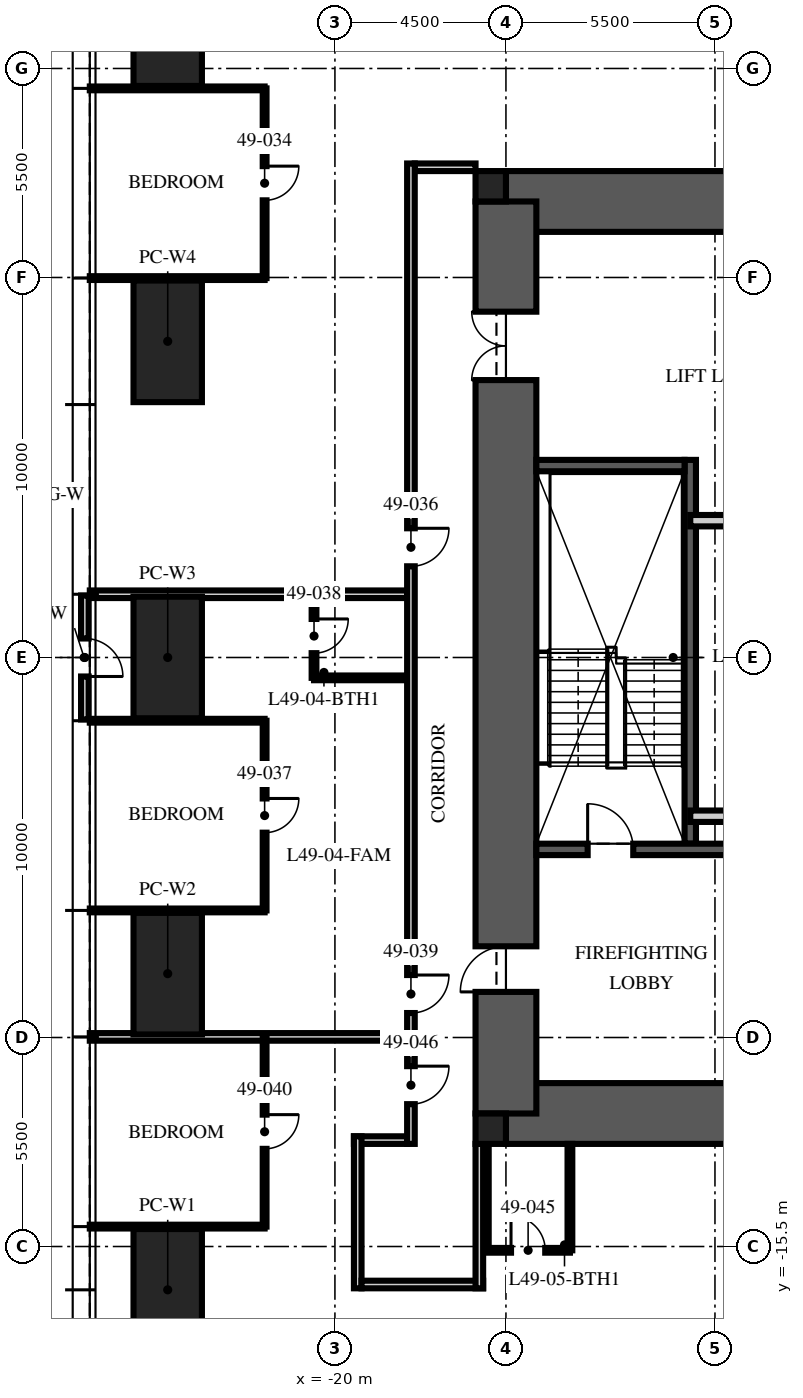
"""IFC4 building model, lengths in metres.
Left out: names, types, materials, properties, quantities, classifications, styles, units other than length and angle.
Written with IfcOpenShell. Run it as: python <this file> out.ifc"""

import sys

from ifc_helpers import new_model, si_unit, direction, frame, frame_2d, origin, origin_2d, place, context, subcontext, project, spatial, rectangle, hollow_rectangle, extrude, element, fill, save


model = new_model("IFC4")
c1 = context("Model", 3, precision=1e-05, world=origin(), true_north=direction((0.0, 1.0)))
c2 = subcontext(c1, "Body", "Model", "MODEL_VIEW")
j1 = project(units=[si_unit("LENGTHUNIT", "METRE"), si_unit("PLANEANGLEUNIT", "RADIAN")], contexts=[c1])
p1 = place(None, origin())
s1 = spatial("IfcSite", under=j1, at=p1, CompositionType="ELEMENT")
p2 = place(p1, origin())
s2 = spatial("IfcBuilding", under=s1, at=p2, CompositionType="ELEMENT")
p3 = place(p2, frame((0.0, 0.0, 199.5)))
s3 = spatial("IfcBuildingStorey", under=s2, at=p3, CompositionType="ELEMENT", Elevation=199.5)
for number, where, z_axis, x_axis in (
    (1, (-15.5, 12.0, -0.25), (0.0, 0.0, 1.0), (1.0, 0.0, 0.0)),
    (2, (-15.5, -12.0, -0.25), (0.0, 0.0, 1.0), (1.0, 0.0, 0.0)),
):
    element("IfcWall", number, at=place(p3, frame(where, z_axis=z_axis, x_axis=x_axis)), inside=s3, PredefinedType="SHEAR", context=c2, shape_type="SweptSolid", body=[
        extrude(rectangle(XDim=31.0, YDim=1.6, at=frame_2d((15.5, 0.0))), origin(), (0.0, 0.0, 1.0), 3.75),
    ])
p4 = place(p3, frame((-15.5, -12.0, -0.25), z_axis=(0.0, 0.0, 1.0), x_axis=(0.0, 1.0, 0.0)))
e3 = element("IfcWall", 3, at=p4, inside=s3, PredefinedType="SHEAR", context=c2, shape_type="SweptSolid", body=[
    extrude(rectangle(XDim=24.0, YDim=1.6, at=frame_2d((12.0, 0.0))), origin(), (0.0, 0.0, 1.0), 3.75),
])
p5 = place(p4, frame((3.2, 0.0, 0.25)))
e4 = element("IfcOpeningElement", 4, at=p5, cuts=e3, PredefinedType="OPENING", context=c2, shape_type="SweptSolid", body=[
    extrude(rectangle(XDim=1.2, YDim=2.1, at=frame_2d((0.6, 1.05))), frame((0.0, 0.81, 0.0), z_axis=(0.0, -1.0, 0.0), x_axis=(1.0, 0.0, 0.0)), (0.0, 0.0, 1.0), 1.62),
])
p6 = place(p4, frame((19.3, 0.0, 0.25)))
e5 = element("IfcOpeningElement", 5, at=p6, cuts=e3, PredefinedType="OPENING", context=c2, shape_type="SweptSolid", body=[
    extrude(rectangle(XDim=1.8, YDim=2.1, at=frame_2d((0.9, 1.05))), frame((0.0, 0.81, 0.0), z_axis=(0.0, -1.0, 0.0), x_axis=(1.0, 0.0, 0.0)), (0.0, 0.0, 1.0), 1.62),
])
for number, where, z_axis, x_axis in (
    (6, (-15.9, 12.4, -0.25), (0.0, 0.0, 1.0), (1.0, 0.0, 0.0)),
    (7, (-15.9, -12.4, -0.25), (0.0, 0.0, 1.0), (1.0, 0.0, 0.0)),
):
    element("IfcColumn", number, at=place(p3, frame(where, z_axis=z_axis, x_axis=x_axis)), inside=s3, PredefinedType="COLUMN", context=c2, shape_type="SweptSolid", body=[
        extrude(rectangle(XDim=0.8, YDim=0.8, at=origin_2d()), origin(), (0.0, 0.0, 1.0), 3.75),
    ])
p7 = place(p3, frame((-24.4, -16.64, 0.08), z_axis=(0.0, 0.0, 1.0), x_axis=(0.0, 1.0, 0.0)))
e8 = element("IfcColumn", 8, at=p7, inside=s3, PredefinedType="COLUMN", context=c2, shape_type="SweptSolid", body=[
    extrude(hollow_rectangle(XDim=3.2, YDim=1.8, WallThickness=0.2, at=origin_2d()), origin(), (0.0, 0.0, 1.0), 3.67),
])
p8 = place(p3, frame((-24.4, -8.32, -0.07), z_axis=(0.0, 0.0, 1.0), x_axis=(0.0, 1.0, 0.0)))
e9 = element("IfcColumn", 9, at=p8, inside=s3, PredefinedType="COLUMN", context=c2, shape_type="SweptSolid", body=[
    extrude(hollow_rectangle(XDim=3.2, YDim=1.8, WallThickness=0.2, at=origin_2d()), origin(), (0.0, 0.0, 1.0), 3.82),
])
p9 = place(p3, frame((-24.4, 0.0, -0.23), z_axis=(0.0, 0.0, 1.0), x_axis=(0.0, 1.0, 0.0)))
e10 = element("IfcColumn", 10, at=p9, inside=s3, PredefinedType="COLUMN", context=c2, shape_type="SweptSolid", body=[
    extrude(hollow_rectangle(XDim=3.2, YDim=1.8, WallThickness=0.2, at=origin_2d()), origin(), (0.0, 0.0, 1.0), 3.98),
])
p10 = place(p3, frame((-24.4, 8.32, -0.07), z_axis=(0.0, 0.0, 1.0), x_axis=(0.0, 1.0, 0.0)))
e11 = element("IfcColumn", 11, at=p10, inside=s3, PredefinedType="COLUMN", context=c2, shape_type="SweptSolid", body=[
    extrude(hollow_rectangle(XDim=3.2, YDim=1.8, WallThickness=0.2, at=origin_2d()), origin(), (0.0, 0.0, 1.0), 3.82),
])
p11 = place(p3, frame((-24.4, 16.64, 0.08), z_axis=(0.0, 0.0, 1.0), x_axis=(0.0, 1.0, 0.0)))
e12 = element("IfcColumn", 12, at=p11, inside=s3, PredefinedType="COLUMN", context=c2, shape_type="SweptSolid", body=[
    extrude(hollow_rectangle(XDim=3.2, YDim=1.8, WallThickness=0.2, at=origin_2d()), origin(), (0.0, 0.0, 1.0), 3.67),
])
p12 = place(p3, frame((-26.58, 1.632, 0.0), z_axis=(0.0, 0.0, 1.0), x_axis=(0.0, -1.0, 0.0)))
e13 = element("IfcWall", 13, at=p12, inside=s3, PredefinedType="ELEMENTEDWALL", context=c2, shape_type="SweptSolid", body=[
    extrude(rectangle(XDim=3.263, YDim=0.2, at=frame_2d((1.632, 0.0))), origin(), (0.0, 0.0, 1.0), 3.75),
])
p13 = place(p12, frame((1.132, 0.0, 0.0)))
e14 = element("IfcOpeningElement", 14, at=p13, cuts=e13, PredefinedType="OPENING", context=c2, shape_type="SweptSolid", body=[
    extrude(rectangle(XDim=1.0, YDim=2.4, at=frame_2d((0.5, 1.2))), frame((0.0, 0.11, 0.0), z_axis=(0.0, -1.0, 0.0), x_axis=(1.0, 0.0, 0.0)), (0.0, 0.0, 1.0), 0.22),
])
p14 = place(p3, frame((-10.65, -4.9, 0.0), z_axis=(0.0, 0.0, 1.0), x_axis=(0.0, 1.0, 0.0)))
e15 = element("IfcWall", 15, at=p14, inside=s3, PredefinedType="SOLIDWALL", context=c2, shape_type="SweptSolid", body=[
    extrude(rectangle(XDim=10.1, YDim=0.3, at=frame_2d((5.05, 0.0))), origin(), (0.0, 0.0, 1.0), 3.5),
])
p15 = place(p3, frame((-14.7, -5.05, 0.0), z_axis=(0.0, 0.0, 1.0), x_axis=(1.0, 0.0, 0.0)))
e16 = element("IfcWall", 16, at=p15, inside=s3, PredefinedType="SOLIDWALL", context=c2, shape_type="SweptSolid", body=[
    extrude(rectangle(XDim=5.9, YDim=0.3, at=frame_2d((2.95, 0.0))), origin(), (0.0, 0.0, 1.0), 3.5),
])
p16 = place(p15, frame((1.35, 0.0, 0.0)))
e17 = element("IfcOpeningElement", 17, at=p16, cuts=e16, PredefinedType="OPENING", context=c2, shape_type="SweptSolid", body=[
    extrude(rectangle(XDim=1.2, YDim=2.1, at=frame_2d((0.6, 1.05))), frame((0.0, 0.16, 0.0), z_axis=(0.0, -1.0, 0.0), x_axis=(1.0, 0.0, 0.0)), (0.0, 0.0, 1.0), 0.32),
])
p17 = place(p3, frame((-14.7, 5.05, 0.0), z_axis=(0.0, 0.0, 1.0), x_axis=(1.0, 0.0, 0.0)))
e18 = element("IfcWall", 18, at=p17, inside=s3, PredefinedType="SOLIDWALL", context=c2, shape_type="SweptSolid", body=[
    extrude(rectangle(XDim=3.9, YDim=0.3, at=frame_2d((1.95, 0.0))), origin(), (0.0, 0.0, 1.0), 3.5),
])
p18 = place(p3, frame((-10.65, 3.6, 0.0), z_axis=(0.0, 0.0, 1.0), x_axis=(1.0, 0.0, 0.0)))
e19 = element("IfcWall", 19, at=p18, inside=s3, PredefinedType="PARTITIONING", context=c2, shape_type="SweptSolid", body=[
    extrude(rectangle(XDim=21.3, YDim=0.3, at=frame_2d((10.65, 0.0))), origin(), (0.0, 0.0, 1.0), 3.5),
])
p19 = place(p18, frame((10.05, 0.0, 0.0)))
e20 = element("IfcOpeningElement", 20, at=p19, cuts=e19, PredefinedType="OPENING", context=c2, shape_type="SweptSolid", body=[
    extrude(rectangle(XDim=1.2, YDim=2.1, at=frame_2d((0.6, 1.05))), frame((0.0, 0.16, 0.0), z_axis=(0.0, -1.0, 0.0), x_axis=(1.0, 0.0, 0.0)), (0.0, 0.0, 1.0), 0.32),
])
p20 = place(p18, frame((19.238, 0.0, 0.0)))
e21 = element("IfcOpeningElement", 21, at=p20, cuts=e19, PredefinedType="OPENING", context=c2, shape_type="SweptSolid", body=[
    extrude(rectangle(XDim=0.9, YDim=2.1, at=frame_2d((0.45, 1.05))), frame((0.0, 0.16, 0.0), z_axis=(0.0, -1.0, 0.0), x_axis=(1.0, 0.0, 0.0)), (0.0, 0.0, 1.0), 0.32),
])
p21 = place(p3, frame((-10.65, -4.177, 0.0), z_axis=(0.0, 0.0, 1.0), x_axis=(1.0, 0.0, 0.0)))
e22 = element("IfcWall", 22, at=p21, inside=s3, PredefinedType="PARTITIONING", context=c2, shape_type="SweptSolid", body=[
    extrude(rectangle(XDim=6.45, YDim=0.3, at=frame_2d((3.225, 0.0))), origin(), (0.0, 0.0, 1.0), 3.5),
])
p22 = place(p3, frame((-18.1, -12.7, 0.0), z_axis=(0.0, 0.0, 1.0), x_axis=(-1.0, 0.0, 0.0)))
e23 = element("IfcWall", 23, at=p22, inside=s3, PredefinedType="PARTITIONING", context=c2, shape_type="SweptSolid", body=[
    extrude(rectangle(XDim=1.4, YDim=0.2, at=frame_2d((0.7, 0.0))), origin(), (0.0, 0.0, 1.0), 2.81),
])
p23 = place(p3, frame((-19.4, -12.6, 0.0), z_axis=(0.0, 0.0, 1.0), x_axis=(0.0, -1.0, 0.0)))
e24 = element("IfcWall", 24, at=p23, inside=s3, PredefinedType="PARTITIONING", context=c2, shape_type="SweptSolid", body=[
    extrude(rectangle(XDim=4.0, YDim=0.2, at=frame_2d((2.0, 0.0))), origin(), (0.0, 0.0, 1.0), 2.6),
])
p24 = place(p3, frame((-19.3, -16.5, 0.0), z_axis=(0.0, 0.0, 1.0), x_axis=(1.0, 0.0, 0.0)))
e25 = element("IfcWall", 25, at=p24, inside=s3, PredefinedType="PARTITIONING", context=c2, shape_type="SweptSolid", body=[
    extrude(rectangle(XDim=3.2, YDim=0.2, at=frame_2d((1.6, 0.0))), origin(), (0.0, 0.0, 1.0), 2.3),
])
p25 = place(p3, frame((-16.2, -16.6, 0.0), z_axis=(0.0, 0.0, 1.0), x_axis=(0.0, 1.0, 0.0)))
e26 = element("IfcWall", 26, at=p25, inside=s3, PredefinedType="PARTITIONING", context=c2, shape_type="SweptSolid", body=[
    extrude(rectangle(XDim=3.8, YDim=0.2, at=frame_2d((1.9, 0.0))), origin(), (0.0, 0.0, 1.0), 2.3),
])
p26 = place(p3, frame((-16.3, 12.9, 0.0), z_axis=(0.0, 0.0, 1.0), x_axis=(-1.0, 0.0, 0.0)))
e27 = element("IfcWall", 27, at=p26, inside=s3, PredefinedType="PARTITIONING", context=c2, shape_type="SweptSolid", body=[
    extrude(rectangle(XDim=1.6, YDim=0.2, at=frame_2d((0.8, 0.0))), origin(), (0.0, 0.0, 1.0), 2.3),
])
for number, where, z_axis, x_axis in (
    (28, (-21.85, 14.976, 0.0), (0.0, 0.0, 1.0), (-1.0, 0.0, 0.0)),
    (29, (-21.85, 9.984, 0.0), (0.0, 0.0, 1.0), (-1.0, 0.0, 0.0)),
):
    element("IfcWall", number, at=place(p3, frame(where, z_axis=z_axis, x_axis=x_axis)), inside=s3, PredefinedType="PARTITIONING", context=c2, shape_type="SweptSolid", body=[
        extrude(rectangle(XDim=4.6, YDim=0.1, at=frame_2d((2.3, 0.0))), origin(), (0.0, 0.0, 1.0), 2.91),
    ])
p27 = place(p3, frame((-18.1, 1.664, 0.0), z_axis=(0.0, 0.0, 1.0), x_axis=(-1.0, 0.0, 0.0)))
e30 = element("IfcWall", 30, at=p27, inside=s3, PredefinedType="PARTITIONING", context=c2, shape_type="SweptSolid", body=[
    extrude(rectangle(XDim=8.35, YDim=0.2, at=frame_2d((4.175, 0.0))), origin(), (0.0, 0.0, 1.0), 2.91),
])
for number, where, z_axis, x_axis in (
    (31, (-21.85, -1.664, 0.0), (0.0, 0.0, 1.0), (-1.0, 0.0, 0.0)),
    (32, (-21.85, -6.656, 0.0), (0.0, 0.0, 1.0), (-1.0, 0.0, 0.0)),
):
    element("IfcWall", number, at=place(p3, frame(where, z_axis=z_axis, x_axis=x_axis)), inside=s3, PredefinedType="PARTITIONING", context=c2, shape_type="SweptSolid", body=[
        extrude(rectangle(XDim=4.6, YDim=0.1, at=frame_2d((2.3, 0.0))), origin(), (0.0, 0.0, 1.0), 2.91),
    ])
p28 = place(p3, frame((-18.1, -9.984, 0.0), z_axis=(0.0, 0.0, 1.0), x_axis=(-1.0, 0.0, 0.0)))
e33 = element("IfcWall", 33, at=p28, inside=s3, PredefinedType="PARTITIONING", context=c2, shape_type="SweptSolid", body=[
    extrude(rectangle(XDim=8.35, YDim=0.2, at=frame_2d((4.175, 0.0))), origin(), (0.0, 0.0, 1.0), 2.91),
])
p29 = place(p3, frame((-21.85, -14.976, 0.0), z_axis=(0.0, 0.0, 1.0), x_axis=(-1.0, 0.0, 0.0)))
e34 = element("IfcWall", 34, at=p29, inside=s3, PredefinedType="PARTITIONING", context=c2, shape_type="SweptSolid", body=[
    extrude(rectangle(XDim=4.6, YDim=0.1, at=frame_2d((2.3, 0.0))), origin(), (0.0, 0.0, 1.0), 2.91),
])
p30 = place(p3, frame((-21.85, 14.976, 0.0), z_axis=(0.0, 0.0, 1.0), x_axis=(0.0, -1.0, 0.0)))
e35 = element("IfcWall", 35, at=p30, inside=s3, PredefinedType="PARTITIONING", context=c2, shape_type="SweptSolid", body=[
    extrude(rectangle(XDim=4.992, YDim=0.1, at=frame_2d((2.496, 0.0))), origin(), (0.0, 0.0, 1.0), 2.81),
])
p31 = place(p30, frame((2.046, 0.0, 0.0)))
e36 = element("IfcOpeningElement", 36, at=p31, cuts=e35, PredefinedType="OPENING", context=c2, shape_type="SweptSolid", body=[
    extrude(rectangle(XDim=0.9, YDim=2.1, at=frame_2d((0.45, 1.05))), frame((0.0, 0.06, 0.0), z_axis=(0.0, -1.0, 0.0), x_axis=(1.0, 0.0, 0.0)), (0.0, 0.0, 1.0), 0.12),
])
p32 = place(p3, frame((-21.85, -1.664, 0.0), z_axis=(0.0, 0.0, 1.0), x_axis=(0.0, -1.0, 0.0)))
e37 = element("IfcWall", 37, at=p32, inside=s3, PredefinedType="PARTITIONING", context=c2, shape_type="SweptSolid", body=[
    extrude(rectangle(XDim=4.992, YDim=0.1, at=frame_2d((2.496, 0.0))), origin(), (0.0, 0.0, 1.0), 2.81),
])
p33 = place(p32, frame((2.046, 0.0, 0.0)))
e38 = element("IfcOpeningElement", 38, at=p33, cuts=e37, PredefinedType="OPENING", context=c2, shape_type="SweptSolid", body=[
    extrude(rectangle(XDim=0.9, YDim=2.1, at=frame_2d((0.45, 1.05))), frame((0.0, 0.06, 0.0), z_axis=(0.0, -1.0, 0.0), x_axis=(1.0, 0.0, 0.0)), (0.0, 0.0, 1.0), 0.12),
])
p34 = place(p3, frame((-20.55, 1.664, 0.0), z_axis=(0.0, 0.0, 1.0), x_axis=(0.0, -1.0, 0.0)))
e39 = element("IfcWall", 39, at=p34, inside=s3, PredefinedType="PARTITIONING", context=c2, shape_type="SweptSolid", body=[
    extrude(rectangle(XDim=2.2, YDim=0.125, at=frame_2d((1.1, 0.0))), origin(), (0.0, 0.0, 1.0), 2.6),
])
p35 = place(p34, frame((0.65, 0.0, 0.0)))
e40 = element("IfcOpeningElement", 40, at=p35, cuts=e39, PredefinedType="OPENING", context=c2, shape_type="SweptSolid", body=[
    extrude(rectangle(XDim=0.9, YDim=2.1, at=frame_2d((0.45, 1.05))), frame((0.0, 0.073, 0.0), z_axis=(0.0, -1.0, 0.0), x_axis=(1.0, 0.0, 0.0)), (0.0, 0.0, 1.0), 0.145),
])
p36 = place(p3, frame((-18.1, -0.536, 0.0), z_axis=(0.0, 0.0, 1.0), x_axis=(-1.0, 0.0, 0.0)))
e41 = element("IfcWall", 41, at=p36, inside=s3, PredefinedType="PARTITIONING", context=c2, shape_type="SweptSolid", body=[
    extrude(rectangle(XDim=2.45, YDim=0.125, at=frame_2d((1.225, 0.0))), origin(), (0.0, 0.0, 1.0), 3.5),
])
p37 = place(p3, frame((-21.85, -9.984, 0.0), z_axis=(0.0, 0.0, 1.0), x_axis=(0.0, -1.0, 0.0)))
e42 = element("IfcWall", 42, at=p37, inside=s3, PredefinedType="PARTITIONING", context=c2, shape_type="SweptSolid", body=[
    extrude(rectangle(XDim=4.992, YDim=0.1, at=frame_2d((2.496, 0.0))), origin(), (0.0, 0.0, 1.0), 2.81),
])
p38 = place(p37, frame((2.046, 0.0, 0.0)))
e43 = element("IfcOpeningElement", 43, at=p38, cuts=e42, PredefinedType="OPENING", context=c2, shape_type="SweptSolid", body=[
    extrude(rectangle(XDim=0.9, YDim=2.1, at=frame_2d((0.45, 1.05))), frame((0.0, 0.06, 0.0), z_axis=(0.0, -1.0, 0.0), x_axis=(1.0, 0.0, 0.0)), (0.0, 0.0, 1.0), 0.12),
])
p39 = place(p3, frame((-16.017, -15.6, 0.0), z_axis=(0.0, 0.0, 1.0), x_axis=(1.0, 0.0, 0.0)))
e44 = element("IfcWall", 44, at=p39, inside=s3, PredefinedType="PARTITIONING", context=c2, shape_type="SweptSolid", body=[
    extrude(rectangle(XDim=2.2, YDim=0.125, at=frame_2d((1.1, 0.0))), origin(), (0.0, 0.0, 1.0), 3.5),
])
p40 = place(p39, frame((0.65, 0.0, 0.0)))
e45 = element("IfcOpeningElement", 45, at=p40, cuts=e44, PredefinedType="OPENING", context=c2, shape_type="SweptSolid", body=[
    extrude(rectangle(XDim=0.9, YDim=2.1, at=frame_2d((0.45, 1.05))), frame((0.0, 0.073, 0.0), z_axis=(0.0, -1.0, 0.0), x_axis=(1.0, 0.0, 0.0)), (0.0, 0.0, 1.0), 0.145),
])
p41 = place(p3, frame((-16.017, -12.8, 0.0), z_axis=(0.0, 0.0, 1.0), x_axis=(0.0, -1.0, 0.0)))
e46 = element("IfcWall", 46, at=p41, inside=s3, PredefinedType="PARTITIONING", context=c2, shape_type="SweptSolid", body=[
    extrude(rectangle(XDim=2.8, YDim=0.125, at=frame_2d((1.4, 0.0))), origin(), (0.0, 0.0, 1.0), 2.3),
])
p42 = place(p3, frame((-13.816, -12.8, 0.0), z_axis=(0.0, 0.0, 1.0), x_axis=(0.0, -1.0, 0.0)))
e47 = element("IfcWall", 47, at=p42, inside=s3, PredefinedType="PARTITIONING", context=c2, shape_type="SweptSolid", body=[
    extrude(rectangle(XDim=2.8, YDim=0.125, at=frame_2d((1.4, 0.0))), origin(), (0.0, 0.0, 1.0), 3.5),
])
p43 = place(p3, frame((-18.0, 13.0, 0.0), z_axis=(0.0, 0.0, 1.0), x_axis=(0.0, -1.0, 0.0)))
e48 = element("IfcWall", 48, at=p43, inside=s3, PredefinedType="PARTITIONING", context=c2, shape_type="SweptSolid", body=[
    extrude(rectangle(XDim=25.8, YDim=0.2, at=frame_2d((12.9, 0.0))), origin(), (0.0, 0.0, 1.0), 2.6),
])
p44 = place(p43, frame((9.6, 0.0, 0.0)))
e49 = element("IfcOpeningElement", 49, at=p44, cuts=e48, PredefinedType="OPENING", context=c2, shape_type="SweptSolid", body=[
    extrude(rectangle(XDim=1.0, YDim=2.2, at=frame_2d((0.5, 1.1))), frame((0.0, 0.11, 0.0), z_axis=(0.0, -1.0, 0.0), x_axis=(1.0, 0.0, 0.0)), (0.0, 0.0, 1.0), 0.22),
])
p45 = place(p43, frame((21.356, 0.0, 0.0)))
e50 = element("IfcOpeningElement", 50, at=p45, cuts=e48, PredefinedType="OPENING", context=c2, shape_type="SweptSolid", body=[
    extrude(rectangle(XDim=1.0, YDim=2.2, at=frame_2d((0.5, 1.1))), frame((0.0, 0.11, 0.0), z_axis=(0.0, -1.0, 0.0), x_axis=(1.0, 0.0, 0.0)), (0.0, 0.0, 1.0), 0.22),
])
p46 = place(p43, frame((23.754, 0.0, 0.0)))
e51 = element("IfcOpeningElement", 51, at=p46, cuts=e48, PredefinedType="OPENING", context=c2, shape_type="SweptSolid", body=[
    extrude(rectangle(XDim=1.0, YDim=2.2, at=frame_2d((0.5, 1.1))), frame((0.0, 0.11, 0.0), z_axis=(0.0, -1.0, 0.0), x_axis=(1.0, 0.0, 0.0)), (0.0, 0.0, 1.0), 0.22),
])
p47 = place(p13, origin())
e52 = element("IfcDoor", 52, at=p47, inside=s3, OperationType="SINGLE_SWING_LEFT", PredefinedType="DOOR", context=c2, shape_type="SweptSolid", body=[
    extrude(rectangle(XDim=1.0, YDim=2.4, at=frame_2d((0.5, 1.2))), frame((0.0, 0.025, 0.0), z_axis=(0.0, -1.0, 0.0), x_axis=(1.0, 0.0, 0.0)), (0.0, 0.0, 1.0), 0.05),
])
fill(e14, e52)
p48 = place(p16, origin())
e53 = element("IfcDoor", 53, at=p48, inside=s3, OperationType="SINGLE_SWING_LEFT", PredefinedType="DOOR", context=c2, shape_type="SweptSolid", body=[
    extrude(rectangle(XDim=1.2, YDim=2.1, at=frame_2d((0.6, 1.05))), frame((0.0, 0.025, 0.0), z_axis=(0.0, -1.0, 0.0), x_axis=(1.0, 0.0, 0.0)), (0.0, 0.0, 1.0), 0.05),
])
fill(e17, e53)
p49 = place(p5, origin())
e54 = element("IfcDoor", 54, at=p49, inside=s3, OperationType="SINGLE_SWING_LEFT", PredefinedType="DOOR", context=c2, shape_type="SweptSolid", body=[
    extrude(rectangle(XDim=1.2, YDim=2.1, at=frame_2d((0.6, 1.05))), frame((0.0, 0.025, 0.0), z_axis=(0.0, -1.0, 0.0), x_axis=(1.0, 0.0, 0.0)), (0.0, 0.0, 1.0), 0.05),
])
fill(e4, e54)
p50 = place(p6, origin())
e55 = element("IfcDoor", 55, at=p50, inside=s3, OperationType="DOUBLE_DOOR_SINGLE_SWING", PredefinedType="DOOR", context=c2, shape_type="SweptSolid", body=[
    extrude(rectangle(XDim=1.8, YDim=2.1, at=frame_2d((0.9, 1.05))), frame((0.0, 0.025, 0.0), z_axis=(0.0, -1.0, 0.0), x_axis=(1.0, 0.0, 0.0)), (0.0, 0.0, 1.0), 0.05),
])
fill(e5, e55)
p51 = place(p31, origin())
e56 = element("IfcDoor", 56, at=p51, inside=s3, OperationType="SINGLE_SWING_LEFT", PredefinedType="DOOR", context=c2, shape_type="SweptSolid", body=[
    extrude(rectangle(XDim=0.9, YDim=2.1, at=frame_2d((0.45, 1.05))), frame((0.0, 0.025, 0.0), z_axis=(0.0, -1.0, 0.0), x_axis=(1.0, 0.0, 0.0)), (0.0, 0.0, 1.0), 0.05),
])
fill(e36, e56)
p52 = place(p44, origin())
e57 = element("IfcDoor", 57, at=p52, inside=s3, OperationType="SINGLE_SWING_LEFT", PredefinedType="DOOR", context=c2, shape_type="SweptSolid", body=[
    extrude(rectangle(XDim=1.0, YDim=2.2, at=frame_2d((0.5, 1.1))), frame((0.0, 0.025, 0.0), z_axis=(0.0, -1.0, 0.0), x_axis=(1.0, 0.0, 0.0)), (0.0, 0.0, 1.0), 0.05),
])
fill(e49, e57)
p53 = place(p33, origin())
e58 = element("IfcDoor", 58, at=p53, inside=s3, OperationType="SINGLE_SWING_LEFT", PredefinedType="DOOR", context=c2, shape_type="SweptSolid", body=[
    extrude(rectangle(XDim=0.9, YDim=2.1, at=frame_2d((0.45, 1.05))), frame((0.0, 0.025, 0.0), z_axis=(0.0, -1.0, 0.0), x_axis=(1.0, 0.0, 0.0)), (0.0, 0.0, 1.0), 0.05),
])
fill(e38, e58)
p54 = place(p35, origin())
e59 = element("IfcDoor", 59, at=p54, inside=s3, OperationType="SINGLE_SWING_LEFT", PredefinedType="DOOR", context=c2, shape_type="SweptSolid", body=[
    extrude(rectangle(XDim=0.9, YDim=2.1, at=frame_2d((0.45, 1.05))), frame((0.0, 0.025, 0.0), z_axis=(0.0, -1.0, 0.0), x_axis=(1.0, 0.0, 0.0)), (0.0, 0.0, 1.0), 0.05),
])
fill(e40, e59)
p55 = place(p45, origin())
e60 = element("IfcDoor", 60, at=p55, inside=s3, OperationType="SINGLE_SWING_LEFT", PredefinedType="DOOR", context=c2, shape_type="SweptSolid", body=[
    extrude(rectangle(XDim=1.0, YDim=2.2, at=frame_2d((0.5, 1.1))), frame((0.0, 0.025, 0.0), z_axis=(0.0, -1.0, 0.0), x_axis=(1.0, 0.0, 0.0)), (0.0, 0.0, 1.0), 0.05),
])
fill(e50, e60)
p56 = place(p38, origin())
e61 = element("IfcDoor", 61, at=p56, inside=s3, OperationType="SINGLE_SWING_LEFT", PredefinedType="DOOR", context=c2, shape_type="SweptSolid", body=[
    extrude(rectangle(XDim=0.9, YDim=2.1, at=frame_2d((0.45, 1.05))), frame((0.0, 0.025, 0.0), z_axis=(0.0, -1.0, 0.0), x_axis=(1.0, 0.0, 0.0)), (0.0, 0.0, 1.0), 0.05),
])
fill(e43, e61)
p57 = place(p40, origin())
e62 = element("IfcDoor", 62, at=p57, inside=s3, OperationType="SINGLE_SWING_LEFT", PredefinedType="DOOR", context=c2, shape_type="SweptSolid", body=[
    extrude(rectangle(XDim=0.9, YDim=2.1, at=frame_2d((0.45, 1.05))), frame((0.0, 0.025, 0.0), z_axis=(0.0, -1.0, 0.0), x_axis=(1.0, 0.0, 0.0)), (0.0, 0.0, 1.0), 0.05),
])
fill(e45, e62)
p58 = place(p46, origin())
e63 = element("IfcDoor", 63, at=p58, inside=s3, OperationType="SINGLE_SWING_LEFT", PredefinedType="DOOR", context=c2, shape_type="SweptSolid", body=[
    extrude(rectangle(XDim=1.0, YDim=2.2, at=frame_2d((0.5, 1.1))), frame((0.0, 0.025, 0.0), z_axis=(0.0, -1.0, 0.0), x_axis=(1.0, 0.0, 0.0)), (0.0, 0.0, 1.0), 0.05),
])
fill(e51, e63)
save(model, sys.argv[1])
